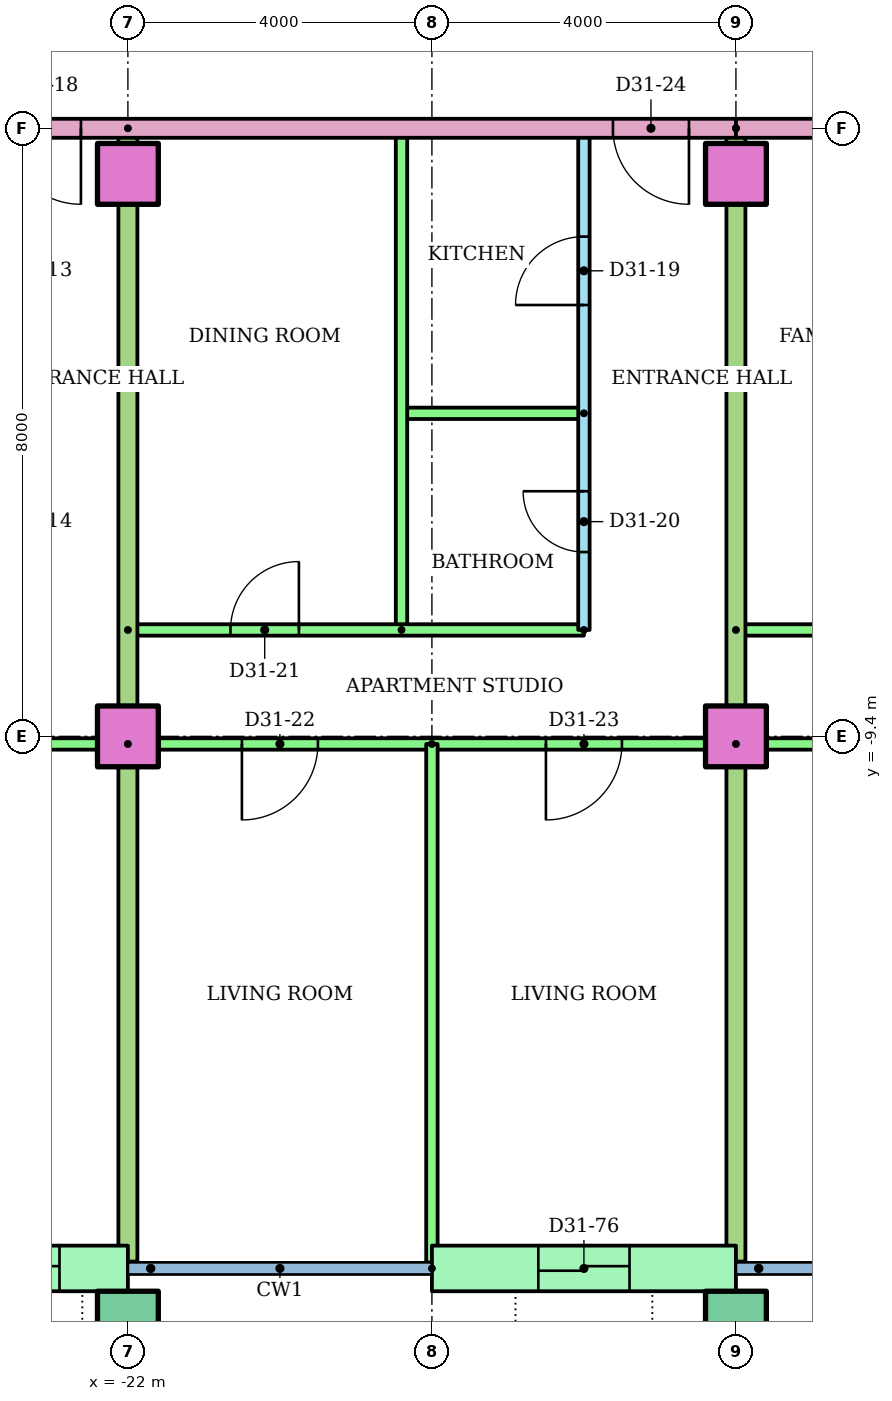
"""IFC4 building model, lengths in metres.
Left out: names, types, materials, properties, quantities, classifications, styles, units other than length and angle.
Written with IfcOpenShell. Run it as: python <this file> out.ifc"""

import sys

from ifc_helpers import new_model, si_unit, direction, frame, frame_2d, origin, origin_2d, place, context, subcontext, project, spatial, rectangle, hollow_rectangle, extrude, element, fill, save


model = new_model("IFC4")
c1 = context("Model", 3, precision=1e-05, world=origin(), true_north=direction((0.0, 1.0)))
c2 = subcontext(c1, "Body", "Model", "MODEL_VIEW")
j1 = project(units=[si_unit("LENGTHUNIT", "METRE"), si_unit("PLANEANGLEUNIT", "RADIAN")], contexts=[c1])
p1 = place(None, origin())
s1 = spatial("IfcSite", under=j1, at=p1, CompositionType="ELEMENT")
p2 = place(p1, origin())
s2 = spatial("IfcBuilding", under=s1, at=p2, CompositionType="ELEMENT")
p3 = place(p2, frame((0.0, 0.0, 123.0)))
s3 = spatial("IfcBuildingStorey", under=s2, at=p3, CompositionType="ELEMENT", Elevation=123.0)
for number, where in (
    (1, (-22.0, -17.1, 0.0)),
    (2, (-14.0, -17.1, 0.0)),
):
    element("IfcColumn", number, at=place(p3, frame(where)), inside=s3, PredefinedType="COLUMN", context=c2, shape_type="SweptSolid", body=[
        extrude(hollow_rectangle(XDim=0.8, YDim=0.8, WallThickness=0.04, at=origin_2d()), origin(), (0.0, 0.0, 1.0), 3.2),
    ])
for number, where in (
    (3, (-22.0, -9.4, 0.0)),
    (4, (-14.0, -9.4, 0.0)),
    (5, (-22.0, -2.0, 0.0)),
    (6, (-14.0, -2.0, 0.0)),
):
    element("IfcColumn", number, at=place(p3, frame(where)), inside=s3, PredefinedType="COLUMN", context=c2, shape_type="SweptSolid", body=[
        extrude(rectangle(XDim=0.8, YDim=0.8, at=origin_2d()), origin(), (0.0, 0.0, 1.0), 3.2),
    ])
p4 = place(p3, frame((-25.0, -16.4, 0.0)))
e7 = element("IfcWall", 7, at=p4, inside=s3, PredefinedType="STANDARD", context=c2, shape_type="SweptSolid", body=[
    extrude(rectangle(XDim=3.0, YDim=0.6, at=frame_2d((1.5, 0.0))), origin(), (0.0, 0.0, 1.0), 2.92),
])
p5 = place(p4, frame((0.9, 0.0, 0.0)))
e8 = element("IfcOpeningElement", 8, at=p5, cuts=e7, PredefinedType="OPENING", context=c2, shape_type="SweptSolid", body=[
    extrude(rectangle(XDim=1.2, YDim=2.1, at=frame_2d((0.6, 1.05))), frame((0.0, 0.31, 0.0), z_axis=(0.0, -1.0, 0.0), x_axis=(1.0, 0.0, 0.0)), (0.0, 0.0, 1.0), 0.62),
])
p6 = place(p3, frame((-18.0, -16.4, 0.0)))
e9 = element("IfcWall", 9, at=p6, inside=s3, PredefinedType="STANDARD", context=c2, shape_type="SweptSolid", body=[
    extrude(rectangle(XDim=4.0, YDim=0.6, at=frame_2d((2.0, 0.0))), origin(), (0.0, 0.0, 1.0), 2.92),
])
p7 = place(p6, frame((1.4, 0.0, 0.0)))
e10 = element("IfcOpeningElement", 10, at=p7, cuts=e9, PredefinedType="OPENING", context=c2, shape_type="SweptSolid", body=[
    extrude(rectangle(XDim=1.2, YDim=2.1, at=frame_2d((0.6, 1.05))), frame((0.0, 0.31, 0.0), z_axis=(0.0, -1.0, 0.0), x_axis=(1.0, 0.0, 0.0)), (0.0, 0.0, 1.0), 0.62),
])
p8 = place(p3, frame((-22.0, -9.5, 0.0), z_axis=(0.0, 0.0, 1.0), x_axis=(-1.0, 0.0, 0.0)))
e11 = element("IfcWall", 11, at=p8, inside=s3, PredefinedType="PARTITIONING", context=c2, shape_type="SweptSolid", body=[
    extrude(rectangle(XDim=10.72, YDim=0.15, at=frame_2d((5.36, 0.0))), origin(), (0.0, 0.0, 1.0), 2.4),
])
p9 = place(p8, frame((8.618, 0.0, 0.0)))
e12 = element("IfcOpeningElement", 12, at=p9, cuts=e11, PredefinedType="OPENING", context=c2, shape_type="SweptSolid", body=[
    extrude(rectangle(XDim=0.9, YDim=2.1, at=frame_2d((0.45, 1.05))), frame((0.0, 0.085, 0.0), z_axis=(0.0, -1.0, 0.0), x_axis=(1.0, 0.0, 0.0)), (0.0, 0.0, 1.0), 0.17),
])
p10 = place(p8, frame((2.5, 0.0, 0.0)))
e13 = element("IfcOpeningElement", 13, at=p10, cuts=e11, PredefinedType="OPENING", context=c2, shape_type="SweptSolid", body=[
    extrude(rectangle(XDim=1.0, YDim=2.1, at=frame_2d((0.5, 1.05))), frame((0.0, 0.085, 0.0), z_axis=(0.0, -1.0, 0.0), x_axis=(1.0, 0.0, 0.0)), (0.0, 0.0, 1.0), 0.17),
])
p11 = place(p3, frame((-16.0, -8.0, 0.0), z_axis=(0.0, 0.0, 1.0), x_axis=(0.0, 1.0, 0.0)))
e14 = element("IfcWall", 14, at=p11, inside=s3, PredefinedType="PARTITIONING", context=c2, shape_type="SweptSolid", body=[
    extrude(rectangle(XDim=6.6, YDim=0.15, at=frame_2d((3.3, 0.0))), origin(), (0.0, 0.0, 1.0), 2.4),
])
p12 = place(p11, frame((4.275, 0.0, 0.0)))
e15 = element("IfcOpeningElement", 15, at=p12, cuts=e14, PredefinedType="OPENING", context=c2, shape_type="SweptSolid", body=[
    extrude(rectangle(XDim=0.9, YDim=2.1, at=frame_2d((0.45, 1.05))), frame((0.0, 0.085, 0.0), z_axis=(0.0, -1.0, 0.0), x_axis=(1.0, 0.0, 0.0)), (0.0, 0.0, 1.0), 0.17),
])
p13 = place(p11, frame((1.025, 0.0, 0.0)))
e16 = element("IfcOpeningElement", 16, at=p13, cuts=e14, PredefinedType="OPENING", context=c2, shape_type="SweptSolid", body=[
    extrude(rectangle(XDim=0.8, YDim=2.1, at=frame_2d((0.4, 1.05))), frame((0.0, 0.085, 0.0), z_axis=(0.0, -1.0, 0.0), x_axis=(1.0, 0.0, 0.0)), (0.0, 0.0, 1.0), 0.17),
])
p14 = place(p3, frame((-16.0, -5.15, 0.0), z_axis=(0.0, 0.0, 1.0), x_axis=(-1.0, 0.0, 0.0)))
e17 = element("IfcWall", 17, at=p14, inside=s3, PredefinedType="PARTITIONING", context=c2, shape_type="SweptSolid", body=[
    extrude(rectangle(XDim=2.4, YDim=0.15, at=frame_2d((1.2, 0.0))), origin(), (0.0, 0.0, 1.0), 2.4),
])
p15 = place(p3, frame((-18.4, -8.0, 0.0), z_axis=(0.0, 0.0, 1.0), x_axis=(0.0, 1.0, 0.0)))
e18 = element("IfcWall", 18, at=p15, inside=s3, PredefinedType="PARTITIONING", context=c2, shape_type="SweptSolid", body=[
    extrude(rectangle(XDim=6.6, YDim=0.15, at=frame_2d((3.3, 0.0))), origin(), (0.0, 0.0, 1.0), 2.4),
])
p16 = place(p3, frame((-22.0, -8.0, 0.0)))
e19 = element("IfcWall", 19, at=p16, inside=s3, PredefinedType="PARTITIONING", context=c2, shape_type="SweptSolid", body=[
    extrude(rectangle(XDim=6.0, YDim=0.15, at=frame_2d((3.0, 0.0))), origin(), (0.0, 0.0, 1.0), 2.4),
])
p17 = place(p16, frame((1.35, 0.0, 0.0)))
e20 = element("IfcOpeningElement", 20, at=p17, cuts=e19, PredefinedType="OPENING", context=c2, shape_type="SweptSolid", body=[
    extrude(rectangle(XDim=0.9, YDim=2.1, at=frame_2d((0.45, 1.05))), frame((0.0, 0.085, 0.0), z_axis=(0.0, -1.0, 0.0), x_axis=(1.0, 0.0, 0.0)), (0.0, 0.0, 1.0), 0.17),
])
p18 = place(p3, frame((-14.0, -9.5, 0.0), z_axis=(0.0, 0.0, 1.0), x_axis=(-1.0, 0.0, 0.0)))
e21 = element("IfcWall", 21, at=p18, inside=s3, PredefinedType="PARTITIONING", context=c2, shape_type="SweptSolid", body=[
    extrude(rectangle(XDim=8.0, YDim=0.15, at=frame_2d((4.0, 0.0))), origin(), (0.0, 0.0, 1.0), 2.4),
])
p19 = place(p18, frame((5.5, 0.0, 0.0)))
e22 = element("IfcOpeningElement", 22, at=p19, cuts=e21, PredefinedType="OPENING", context=c2, shape_type="SweptSolid", body=[
    extrude(rectangle(XDim=1.0, YDim=2.1, at=frame_2d((0.5, 1.05))), frame((0.0, 0.085, 0.0), z_axis=(0.0, -1.0, 0.0), x_axis=(1.0, 0.0, 0.0)), (0.0, 0.0, 1.0), 0.17),
])
p20 = place(p18, frame((1.5, 0.0, 0.0)))
e23 = element("IfcOpeningElement", 23, at=p20, cuts=e21, PredefinedType="OPENING", context=c2, shape_type="SweptSolid", body=[
    extrude(rectangle(XDim=1.0, YDim=2.1, at=frame_2d((0.5, 1.05))), frame((0.0, 0.085, 0.0), z_axis=(0.0, -1.0, 0.0), x_axis=(1.0, 0.0, 0.0)), (0.0, 0.0, 1.0), 0.17),
])
p21 = place(p3, frame((-18.0, -9.5, 0.0), z_axis=(0.0, 0.0, 1.0), x_axis=(0.0, -1.0, 0.0)))
e24 = element("IfcWall", 24, at=p21, inside=s3, PredefinedType="PARTITIONING", context=c2, shape_type="SweptSolid", body=[
    extrude(rectangle(XDim=6.821, YDim=0.15, at=frame_2d((3.411, 0.0))), origin(), (0.0, 0.0, 1.0), 2.4),
])
p22 = place(p3, frame((-22.0, -1.4, 0.0), z_axis=(0.0, 0.0, 1.0), x_axis=(0.0, -1.0, 0.0)))
e25 = element("IfcWall", 25, at=p22, inside=s3, PredefinedType="PARTITIONING", context=c2, shape_type="SweptSolid", body=[
    extrude(rectangle(XDim=14.91, YDim=0.25, at=frame_2d((7.455, 0.0))), origin(), (0.0, 0.0, 1.0), 2.4),
])
p23 = place(p3, frame((-14.0, -8.0, 0.0)))
e26 = element("IfcWall", 26, at=p23, inside=s3, PredefinedType="PARTITIONING", context=c2, shape_type="SweptSolid", body=[
    extrude(rectangle(XDim=14.0, YDim=0.15, at=frame_2d((7.0, 0.0))), origin(), (0.0, 0.0, 1.0), 2.4),
])
p24 = place(p23, frame((8.775, 0.0, 0.0)))
e27 = element("IfcOpeningElement", 27, at=p24, cuts=e26, PredefinedType="OPENING", context=c2, shape_type="SweptSolid", body=[
    extrude(rectangle(XDim=0.9, YDim=2.1, at=frame_2d((0.45, 1.05))), frame((0.0, 0.085, 0.0), z_axis=(0.0, -1.0, 0.0), x_axis=(1.0, 0.0, 0.0)), (0.0, 0.0, 1.0), 0.17),
])
p25 = place(p23, frame((4.525, 0.0, 0.0)))
e28 = element("IfcOpeningElement", 28, at=p25, cuts=e26, PredefinedType="OPENING", context=c2, shape_type="SweptSolid", body=[
    extrude(rectangle(XDim=0.9, YDim=2.1, at=frame_2d((0.45, 1.05))), frame((0.0, 0.085, 0.0), z_axis=(0.0, -1.0, 0.0), x_axis=(1.0, 0.0, 0.0)), (0.0, 0.0, 1.0), 0.17),
])
p26 = place(p23, frame((1.1, 0.0, 0.0)))
e29 = element("IfcOpeningElement", 29, at=p26, cuts=e26, PredefinedType="OPENING", context=c2, shape_type="SweptSolid", body=[
    extrude(rectangle(XDim=0.9, YDim=2.1, at=frame_2d((0.45, 1.05))), frame((0.0, 0.085, 0.0), z_axis=(0.0, -1.0, 0.0), x_axis=(1.0, 0.0, 0.0)), (0.0, 0.0, 1.0), 0.17),
])
p27 = place(p3, frame((2.0, -9.5, 0.0), z_axis=(0.0, 0.0, 1.0), x_axis=(-1.0, 0.0, 0.0)))
e30 = element("IfcWall", 30, at=p27, inside=s3, PredefinedType="PARTITIONING", context=c2, shape_type="SweptSolid", body=[
    extrude(rectangle(XDim=16.0, YDim=0.15, at=frame_2d((8.0, 0.0))), origin(), (0.0, 0.0, 1.0), 2.4),
])
p28 = place(p27, frame((13.55, 0.0, 0.0)))
e31 = element("IfcOpeningElement", 31, at=p28, cuts=e30, PredefinedType="OPENING", context=c2, shape_type="SweptSolid", body=[
    extrude(rectangle(XDim=0.9, YDim=2.1, at=frame_2d((0.45, 1.05))), frame((0.0, 0.085, 0.0), z_axis=(0.0, -1.0, 0.0), x_axis=(1.0, 0.0, 0.0)), (0.0, 0.0, 1.0), 0.17),
])
p29 = place(p27, frame((9.5, 0.0, 0.0)))
e32 = element("IfcOpeningElement", 32, at=p29, cuts=e30, PredefinedType="OPENING", context=c2, shape_type="SweptSolid", body=[
    extrude(rectangle(XDim=1.0, YDim=2.1, at=frame_2d((0.5, 1.05))), frame((0.0, 0.085, 0.0), z_axis=(0.0, -1.0, 0.0), x_axis=(1.0, 0.0, 0.0)), (0.0, 0.0, 1.0), 0.17),
])
p30 = place(p27, frame((5.55, 0.0, 0.0)))
e33 = element("IfcOpeningElement", 33, at=p30, cuts=e30, PredefinedType="OPENING", context=c2, shape_type="SweptSolid", body=[
    extrude(rectangle(XDim=0.9, YDim=2.1, at=frame_2d((0.45, 1.05))), frame((0.0, 0.085, 0.0), z_axis=(0.0, -1.0, 0.0), x_axis=(1.0, 0.0, 0.0)), (0.0, 0.0, 1.0), 0.17),
])
p31 = place(p27, frame((1.55, 0.0, 0.0)))
e34 = element("IfcOpeningElement", 34, at=p31, cuts=e30, PredefinedType="OPENING", context=c2, shape_type="SweptSolid", body=[
    extrude(rectangle(XDim=0.9, YDim=2.1, at=frame_2d((0.45, 1.05))), frame((0.0, 0.085, 0.0), z_axis=(0.0, -1.0, 0.0), x_axis=(1.0, 0.0, 0.0)), (0.0, 0.0, 1.0), 0.17),
])
p32 = place(p3, frame((-14.0, -1.4, 0.0), z_axis=(0.0, 0.0, 1.0), x_axis=(0.0, -1.0, 0.0)))
e35 = element("IfcWall", 35, at=p32, inside=s3, PredefinedType="PARTITIONING", context=c2, shape_type="SweptSolid", body=[
    extrude(rectangle(XDim=14.91, YDim=0.25, at=frame_2d((7.455, 0.0))), origin(), (0.0, 0.0, 1.0), 2.4),
])
p33 = place(p3, frame((-14.0, -1.4, 0.0), z_axis=(0.0, 0.0, 1.0), x_axis=(-1.0, 0.0, 0.0)))
e36 = element("IfcWall", 36, at=p33, inside=s3, PredefinedType="PARTITIONING", context=c2, shape_type="SweptSolid", body=[
    extrude(rectangle(XDim=15.0, YDim=0.25, at=frame_2d((7.5, 0.0))), origin(), (0.0, 0.0, 1.0), 2.4),
])
p34 = place(p33, frame((8.618, 0.0, 0.0)))
e37 = element("IfcOpeningElement", 37, at=p34, cuts=e36, PredefinedType="OPENING", context=c2, shape_type="SweptSolid", body=[
    extrude(rectangle(XDim=1.0, YDim=2.1, at=frame_2d((0.5, 1.05))), frame((0.0, 0.135, 0.0), z_axis=(0.0, -1.0, 0.0), x_axis=(1.0, 0.0, 0.0)), (0.0, 0.0, 1.0), 0.27),
])
p35 = place(p33, frame((0.618, 0.0, 0.0)))
e38 = element("IfcOpeningElement", 38, at=p35, cuts=e36, PredefinedType="OPENING", context=c2, shape_type="SweptSolid", body=[
    extrude(rectangle(XDim=1.0, YDim=2.1, at=frame_2d((0.5, 1.05))), frame((0.0, 0.135, 0.0), z_axis=(0.0, -1.0, 0.0), x_axis=(1.0, 0.0, 0.0)), (0.0, 0.0, 1.0), 0.27),
])
p36 = place(p3, frame((14.0, -1.4, 0.0), z_axis=(0.0, 0.0, 1.0), x_axis=(-1.0, 0.0, 0.0)))
e39 = element("IfcWall", 39, at=p36, inside=s3, PredefinedType="PARTITIONING", context=c2, shape_type="SweptSolid", body=[
    extrude(rectangle(XDim=28.0, YDim=0.25, at=frame_2d((14.0, 0.0))), origin(), (0.0, 0.0, 1.0), 2.4),
])
p37 = place(p36, frame((12.618, 0.0, 0.0)))
e40 = element("IfcOpeningElement", 40, at=p37, cuts=e39, PredefinedType="OPENING", context=c2, shape_type="SweptSolid", body=[
    extrude(rectangle(XDim=1.0, YDim=2.1, at=frame_2d((0.5, 1.05))), frame((0.0, 0.135, 0.0), z_axis=(0.0, -1.0, 0.0), x_axis=(1.0, 0.0, 0.0)), (0.0, 0.0, 1.0), 0.27),
])
p38 = place(p36, frame((10.382, 0.0, 0.0)))
e41 = element("IfcOpeningElement", 41, at=p38, cuts=e39, PredefinedType="OPENING", context=c2, shape_type="SweptSolid", body=[
    extrude(rectangle(XDim=1.0, YDim=2.1, at=frame_2d((0.5, 1.05))), frame((0.0, 0.135, 0.0), z_axis=(0.0, -1.0, 0.0), x_axis=(1.0, 0.0, 0.0)), (0.0, 0.0, 1.0), 0.27),
])
p39 = place(p34, origin())
e42 = element("IfcDoor", 42, at=p39, inside=s3, OperationType="SINGLE_SWING_LEFT", PredefinedType="DOOR", context=c2, shape_type="SweptSolid", body=[
    extrude(rectangle(XDim=1.0, YDim=2.1, at=frame_2d((0.5, 1.05))), frame((0.0, 0.025, 0.0), z_axis=(0.0, -1.0, 0.0), x_axis=(1.0, 0.0, 0.0)), (0.0, 0.0, 1.0), 0.05),
])
fill(e37, e42)
p40 = place(p12, origin())
e43 = element("IfcDoor", 43, at=p40, inside=s3, OperationType="SINGLE_SWING_LEFT", PredefinedType="DOOR", context=c2, shape_type="SweptSolid", body=[
    extrude(rectangle(XDim=0.9, YDim=2.1, at=frame_2d((0.45, 1.05))), frame((0.0, 0.025, 0.0), z_axis=(0.0, -1.0, 0.0), x_axis=(1.0, 0.0, 0.0)), (0.0, 0.0, 1.0), 0.05),
])
fill(e15, e43)
p41 = place(p13, origin())
e44 = element("IfcDoor", 44, at=p41, inside=s3, OperationType="SINGLE_SWING_RIGHT", PredefinedType="DOOR", context=c2, shape_type="SweptSolid", body=[
    extrude(rectangle(XDim=0.8, YDim=2.1, at=frame_2d((0.4, 1.05))), frame((0.0, 0.025, 0.0), z_axis=(0.0, -1.0, 0.0), x_axis=(1.0, 0.0, 0.0)), (0.0, 0.0, 1.0), 0.05),
])
fill(e16, e44)
p42 = place(p17, origin())
e45 = element("IfcDoor", 45, at=p42, inside=s3, OperationType="SINGLE_SWING_RIGHT", PredefinedType="DOOR", context=c2, shape_type="SweptSolid", body=[
    extrude(rectangle(XDim=0.9, YDim=2.1, at=frame_2d((0.45, 1.05))), frame((0.0, 0.025, 0.0), z_axis=(0.0, -1.0, 0.0), x_axis=(1.0, 0.0, 0.0)), (0.0, 0.0, 1.0), 0.05),
])
fill(e20, e45)
p43 = place(p19, origin())
e46 = element("IfcDoor", 46, at=p43, inside=s3, OperationType="SINGLE_SWING_RIGHT", PredefinedType="DOOR", context=c2, shape_type="SweptSolid", body=[
    extrude(rectangle(XDim=1.0, YDim=2.1, at=frame_2d((0.5, 1.05))), frame((0.0, 0.025, 0.0), z_axis=(0.0, -1.0, 0.0), x_axis=(1.0, 0.0, 0.0)), (0.0, 0.0, 1.0), 0.05),
])
fill(e22, e46)
p44 = place(p20, origin())
e47 = element("IfcDoor", 47, at=p44, inside=s3, OperationType="SINGLE_SWING_RIGHT", PredefinedType="DOOR", context=c2, shape_type="SweptSolid", body=[
    extrude(rectangle(XDim=1.0, YDim=2.1, at=frame_2d((0.5, 1.05))), frame((0.0, 0.025, 0.0), z_axis=(0.0, -1.0, 0.0), x_axis=(1.0, 0.0, 0.0)), (0.0, 0.0, 1.0), 0.05),
])
fill(e23, e47)
p45 = place(p35, origin())
e48 = element("IfcDoor", 48, at=p45, inside=s3, OperationType="SINGLE_SWING_LEFT", PredefinedType="DOOR", context=c2, shape_type="SweptSolid", body=[
    extrude(rectangle(XDim=1.0, YDim=2.1, at=frame_2d((0.5, 1.05))), frame((0.0, 0.025, 0.0), z_axis=(0.0, -1.0, 0.0), x_axis=(1.0, 0.0, 0.0)), (0.0, 0.0, 1.0), 0.05),
])
fill(e38, e48)
p46 = place(p5, origin())
e49 = element("IfcDoor", 49, at=p46, inside=s3, OperationType="SLIDING_TO_LEFT", PredefinedType="DOOR", context=c2, shape_type="SweptSolid", body=[
    extrude(rectangle(XDim=1.2, YDim=2.1, at=frame_2d((0.6, 1.05))), frame((0.0, 0.025, 0.0), z_axis=(0.0, -1.0, 0.0), x_axis=(1.0, 0.0, 0.0)), (0.0, 0.0, 1.0), 0.05),
])
fill(e8, e49)
p47 = place(p7, origin())
e50 = element("IfcDoor", 50, at=p47, inside=s3, OperationType="SLIDING_TO_LEFT", PredefinedType="DOOR", context=c2, shape_type="SweptSolid", body=[
    extrude(rectangle(XDim=1.2, YDim=2.1, at=frame_2d((0.6, 1.05))), frame((0.0, 0.025, 0.0), z_axis=(0.0, -1.0, 0.0), x_axis=(1.0, 0.0, 0.0)), (0.0, 0.0, 1.0), 0.05),
])
fill(e10, e50)
save(model, sys.argv[1])
